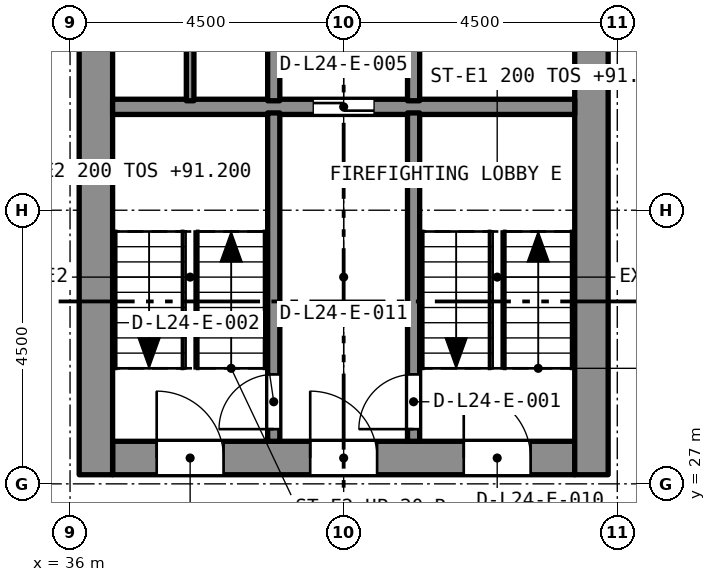
"""IFC4 building model, lengths in metres.
Left out: names, types, materials, properties, quantities, classifications, styles, units other than length and angle.
Written with IfcOpenShell. Run it as: python <this file> out.ifc"""

import sys

from ifc_helpers import new_model, si_unit, direction, frame, frame_2d, origin, place, context, subcontext, project, spatial, rectangle, extrude, element, fill, save


model = new_model("IFC4")
c1 = context("Model", 3, precision=1e-05, world=origin(), true_north=direction((0.0, 1.0)))
c2 = subcontext(c1, "Body", "Model", "MODEL_VIEW")
j1 = project(units=[si_unit("LENGTHUNIT", "METRE"), si_unit("PLANEANGLEUNIT", "RADIAN")], contexts=[c1])
p1 = place(None, origin())
s1 = spatial("IfcSite", under=j1, at=p1, CompositionType="ELEMENT")
p2 = place(p1, origin())
s2 = spatial("IfcBuilding", under=s1, at=p2, CompositionType="ELEMENT")
p3 = place(p2, frame((0.0, 0.0, 89.6)))
s3 = spatial("IfcBuildingStorey", under=s2, at=p3, CompositionType="ELEMENT", Elevation=89.6)
p4 = place(p3, frame((36.7, 27.425, 0.0), z_axis=(0.0, 0.0, 1.0), x_axis=(1.0, 0.0, 0.0)))
e1 = element("IfcWall", 1, at=p4, inside=s3, PredefinedType="SOLIDWALL", context=c2, shape_type="SweptSolid", body=[
    extrude(rectangle(XDim=7.6, YDim=0.55, at=frame_2d((3.8, 0.0))), origin(), (0.0, 0.0, 1.0), 3.2),
])
p5 = place(p4, frame((5.775, 0.0, 0.0)))
e2 = element("IfcOpeningElement", 2, at=p5, cuts=e1, PredefinedType="OPENING", context=c2, shape_type="SweptSolid", body=[
    extrude(rectangle(XDim=1.1, YDim=2.1, at=frame_2d((0.55, 1.05))), frame((0.0, 0.285, 0.0), z_axis=(0.0, -1.0, 0.0), x_axis=(1.0, 0.0, 0.0)), (0.0, 0.0, 1.0), 0.57),
])
p6 = place(p4, frame((3.25, 0.0, 0.0)))
e3 = element("IfcOpeningElement", 3, at=p6, cuts=e1, PredefinedType="OPENING", context=c2, shape_type="SweptSolid", body=[
    extrude(rectangle(XDim=1.1, YDim=2.1, at=frame_2d((0.55, 1.05))), frame((0.0, 0.285, 0.0), z_axis=(0.0, -1.0, 0.0), x_axis=(1.0, 0.0, 0.0)), (0.0, 0.0, 1.0), 0.57),
])
p7 = place(p4, frame((0.725, 0.0, 0.0)))
e4 = element("IfcOpeningElement", 4, at=p7, cuts=e1, PredefinedType="OPENING", context=c2, shape_type="SweptSolid", body=[
    extrude(rectangle(XDim=1.1, YDim=2.1, at=frame_2d((0.55, 1.05))), frame((0.0, 0.285, 0.0), z_axis=(0.0, -1.0, 0.0), x_axis=(1.0, 0.0, 0.0)), (0.0, 0.0, 1.0), 0.57),
])
p8 = place(p3, frame((36.425, 27.15, 0.0), z_axis=(0.0, 0.0, 1.0), x_axis=(0.0, 1.0, 0.0)))
e5 = element("IfcWall", 5, at=p8, inside=s3, PredefinedType="SOLIDWALL", context=c2, shape_type="SweptSolid", body=[
    extrude(rectangle(XDim=13.2, YDim=0.55, at=frame_2d((6.6, 0.0))), origin(), (0.0, 0.0, 1.0), 3.2),
])
p9 = place(p8, frame((8.8, 0.0, 0.0)))
e6 = element("IfcOpeningElement", 6, at=p9, cuts=e5, PredefinedType="OPENING", context=c2, shape_type="SweptSolid", body=[
    extrude(rectangle(XDim=1.2, YDim=2.1, at=frame_2d((0.6, 1.05))), frame((0.0, 0.285, 0.0), z_axis=(0.0, -1.0, 0.0), x_axis=(1.0, 0.0, 0.0)), (0.0, 0.0, 1.0), 0.57),
])
p10 = place(p3, frame((44.575, 27.15, 0.0), z_axis=(0.0, 0.0, 1.0), x_axis=(0.0, 1.0, 0.0)))
e7 = element("IfcWall", 7, at=p10, inside=s3, PredefinedType="SOLIDWALL", context=c2, shape_type="SweptSolid", body=[
    extrude(rectangle(XDim=13.2, YDim=0.55, at=frame_2d((6.6, 0.0))), origin(), (0.0, 0.0, 1.0), 3.2),
])
p11 = place(p10, frame((8.8, 0.0, 0.0)))
e8 = element("IfcOpeningElement", 8, at=p11, cuts=e7, PredefinedType="OPENING", context=c2, shape_type="SweptSolid", body=[
    extrude(rectangle(XDim=1.2, YDim=2.1, at=frame_2d((0.6, 1.05))), frame((0.0, 0.285, 0.0), z_axis=(0.0, -1.0, 0.0), x_axis=(1.0, 0.0, 0.0)), (0.0, 0.0, 1.0), 0.57),
])
p12 = place(p3, frame((36.7, 33.2, 0.0), z_axis=(0.0, 0.0, 1.0), x_axis=(1.0, 0.0, 0.0)))
e9 = element("IfcWall", 9, at=p12, inside=s3, PredefinedType="SOLIDWALL", context=c2, shape_type="SweptSolid", body=[
    extrude(rectangle(XDim=7.6, YDim=0.25, at=frame_2d((3.8, 0.0))), origin(), (0.0, 0.0, 1.0), 2.9),
])
p13 = place(p12, frame((3.3, 0.0, 0.0)))
e10 = element("IfcOpeningElement", 10, at=p13, cuts=e9, PredefinedType="OPENING", context=c2, shape_type="SweptSolid", body=[
    extrude(rectangle(XDim=1.0, YDim=2.1, at=frame_2d((0.5, 1.05))), frame((0.0, 0.135, 0.0), z_axis=(0.0, -1.0, 0.0), x_axis=(1.0, 0.0, 0.0)), (0.0, 0.0, 1.0), 0.27),
])
p14 = place(p3, frame((41.65, 27.7, 0.0), z_axis=(0.0, 0.0, 1.0), x_axis=(0.0, 1.0, 0.0)))
e11 = element("IfcWall", 11, at=p14, inside=s3, PredefinedType="SOLIDWALL", context=c2, shape_type="SweptSolid", body=[
    extrude(rectangle(XDim=5.4, YDim=0.2, at=frame_2d((2.7, 0.0))), origin(), (0.0, 0.0, 1.0), 2.9),
])
p15 = place(p14, frame((0.2, 0.0, 0.0)))
e12 = element("IfcOpeningElement", 12, at=p15, cuts=e11, PredefinedType="OPENING", context=c2, shape_type="SweptSolid", body=[
    extrude(rectangle(XDim=0.9, YDim=2.1, at=frame_2d((0.45, 1.05))), frame((0.0, 0.11, 0.0), z_axis=(0.0, -1.0, 0.0), x_axis=(1.0, 0.0, 0.0)), (0.0, 0.0, 1.0), 0.22),
])
p16 = place(p3, frame((39.35, 27.7, 0.0), z_axis=(0.0, 0.0, 1.0), x_axis=(0.0, 1.0, 0.0)))
e13 = element("IfcWall", 13, at=p16, inside=s3, PredefinedType="SOLIDWALL", context=c2, shape_type="SweptSolid", body=[
    extrude(rectangle(XDim=5.4, YDim=0.2, at=frame_2d((2.7, 0.0))), origin(), (0.0, 0.0, 1.0), 2.9),
])
p17 = place(p16, frame((0.2, 0.0, 0.0)))
e14 = element("IfcOpeningElement", 14, at=p17, cuts=e13, PredefinedType="OPENING", context=c2, shape_type="SweptSolid", body=[
    extrude(rectangle(XDim=0.9, YDim=2.1, at=frame_2d((0.45, 1.05))), frame((0.0, 0.11, 0.0), z_axis=(0.0, -1.0, 0.0), x_axis=(1.0, 0.0, 0.0)), (0.0, 0.0, 1.0), 0.22),
])
for number, where, z_axis, x_axis in (
    (15, (41.65, 33.3, 0.0), (0.0, 0.0, 1.0), (0.0, 1.0, 0.0)),
    (16, (39.35, 33.3, 0.0), (0.0, 0.0, 1.0), (0.0, 1.0, 0.0)),
):
    element("IfcWall", number, at=place(p3, frame(where, z_axis=z_axis, x_axis=x_axis)), inside=s3, PredefinedType="SOLIDWALL", context=c2, shape_type="SweptSolid", body=[
        extrude(rectangle(XDim=2.3, YDim=0.2, at=frame_2d((1.15, 0.0))), origin(), (0.0, 0.0, 1.0), 2.9),
    ])
p18 = place(p3, frame((37.975, 33.3, 0.0), z_axis=(0.0, 0.0, 1.0), x_axis=(0.0, 1.0, 0.0)))
e17 = element("IfcWall", 17, at=p18, inside=s3, PredefinedType="PARTITIONING", context=c2, shape_type="SweptSolid", body=[
    extrude(rectangle(XDim=2.3, YDim=0.125, at=frame_2d((1.15, 0.0))), origin(), (0.0, 0.0, 1.0), 2.9),
])
p19 = place(p15, origin())
e18 = element("IfcDoor", 18, at=p19, inside=s3, OperationType="SINGLE_SWING_LEFT", PredefinedType="DOOR", context=c2, shape_type="SweptSolid", body=[
    extrude(rectangle(XDim=0.9, YDim=2.1, at=frame_2d((0.45, 1.05))), frame((0.0, 0.025, 0.0), z_axis=(0.0, -1.0, 0.0), x_axis=(1.0, 0.0, 0.0)), (0.0, 0.0, 1.0), 0.05),
])
fill(e12, e18)
p20 = place(p17, origin())
e19 = element("IfcDoor", 19, at=p20, inside=s3, OperationType="SINGLE_SWING_LEFT", PredefinedType="DOOR", context=c2, shape_type="SweptSolid", body=[
    extrude(rectangle(XDim=0.9, YDim=2.1, at=frame_2d((0.45, 1.05))), frame((0.0, 0.025, 0.0), z_axis=(0.0, -1.0, 0.0), x_axis=(1.0, 0.0, 0.0)), (0.0, 0.0, 1.0), 0.05),
])
fill(e14, e19)
p21 = place(p13, origin())
e20 = element("IfcDoor", 20, at=p21, inside=s3, OperationType="SLIDING_TO_LEFT", PredefinedType="DOOR", context=c2, shape_type="SweptSolid", body=[
    extrude(rectangle(XDim=1.0, YDim=2.1, at=frame_2d((0.5, 1.05))), frame((0.0, 0.025, 0.0), z_axis=(0.0, -1.0, 0.0), x_axis=(1.0, 0.0, 0.0)), (0.0, 0.0, 1.0), 0.05),
])
fill(e10, e20)
p22 = place(p5, origin())
e21 = element("IfcDoor", 21, at=p22, inside=s3, OperationType="SINGLE_SWING_LEFT", PredefinedType="DOOR", context=c2, shape_type="SweptSolid", body=[
    extrude(rectangle(XDim=1.1, YDim=2.1, at=frame_2d((0.55, 1.05))), frame((0.0, 0.025, 0.0), z_axis=(0.0, -1.0, 0.0), x_axis=(1.0, 0.0, 0.0)), (0.0, 0.0, 1.0), 0.05),
])
fill(e2, e21)
p23 = place(p6, origin())
e22 = element("IfcDoor", 22, at=p23, inside=s3, OperationType="SINGLE_SWING_LEFT", PredefinedType="DOOR", context=c2, shape_type="SweptSolid", body=[
    extrude(rectangle(XDim=1.1, YDim=2.1, at=frame_2d((0.55, 1.05))), frame((0.0, 0.025, 0.0), z_axis=(0.0, -1.0, 0.0), x_axis=(1.0, 0.0, 0.0)), (0.0, 0.0, 1.0), 0.05),
])
fill(e3, e22)
p24 = place(p7, origin())
e23 = element("IfcDoor", 23, at=p24, inside=s3, OperationType="SINGLE_SWING_LEFT", PredefinedType="DOOR", context=c2, shape_type="SweptSolid", body=[
    extrude(rectangle(XDim=1.1, YDim=2.1, at=frame_2d((0.55, 1.05))), frame((0.0, 0.025, 0.0), z_axis=(0.0, -1.0, 0.0), x_axis=(1.0, 0.0, 0.0)), (0.0, 0.0, 1.0), 0.05),
])
fill(e4, e23)
save(model, sys.argv[1])
